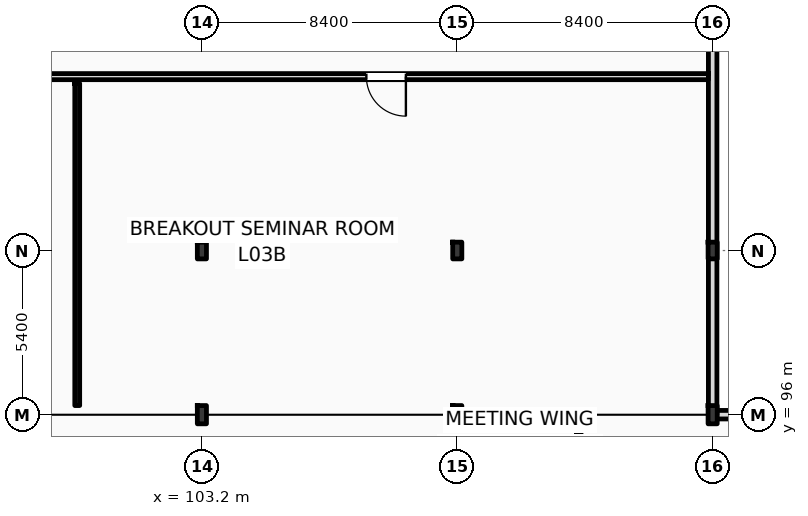
"""IFC4 building model, lengths in metres.
Left out: names, types, materials, properties, quantities, classifications, styles, units other than length and angle.
Written with IfcOpenShell. Run it as: python <this file> out.ifc"""

import sys

from ifc_helpers import new_model, si_unit, direction, frame, frame_2d, origin, origin_2d, place, context, subcontext, project, spatial, rectangle, i_section, extrude, element, fill, save


model = new_model("IFC4")
c1 = context("Model", 3, precision=1e-05, world=origin(), true_north=direction((0.0, 1.0)))
c2 = subcontext(c1, "Body", "Model", "MODEL_VIEW")
j1 = project(units=[si_unit("LENGTHUNIT", "METRE"), si_unit("PLANEANGLEUNIT", "RADIAN")], contexts=[c1])
p1 = place(None, origin())
s1 = spatial("IfcSite", under=j1, at=p1, CompositionType="ELEMENT")
p2 = place(p1, origin())
s2 = spatial("IfcBuilding", under=s1, at=p2, CompositionType="ELEMENT")
p3 = place(p2, frame((0.0, 0.0, 16.2)))
s3 = spatial("IfcBuildingStorey", under=s2, at=p3, CompositionType="ELEMENT", Elevation=16.2)
p4 = place(p3, frame((103.2, 96.0, 0.0), z_axis=(0.0, 0.0, 1.0), x_axis=(1.0, 0.0, 0.0)))
e1 = element("IfcColumn", 1, at=p4, inside=s3, PredefinedType="COLUMN", context=c2, shape_type="SweptSolid", body=[
    extrude(i_section(OverallWidth=0.3, OverallDepth=0.6, WebThickness=0.015, FlangeThickness=0.03, FilletRadius=0.027, at=origin_2d()), origin(), (0.0, 0.0, 1.0), 4.2),
])
p5 = place(p3, frame((103.2, 101.4, 0.0), z_axis=(0.0, 0.0, 1.0), x_axis=(1.0, 0.0, 0.0)))
e2 = element("IfcColumn", 2, at=p5, inside=s3, PredefinedType="COLUMN", context=c2, shape_type="SweptSolid", body=[
    extrude(i_section(OverallWidth=0.3, OverallDepth=0.55, WebThickness=0.015, FlangeThickness=0.029, FilletRadius=0.027, at=origin_2d()), origin(), (0.0, 0.0, 1.0), 4.2),
])
p6 = place(p3, frame((111.6, 96.0, 0.0), z_axis=(0.0, 0.0, 1.0), x_axis=(1.0, 0.0, 0.0)))
e3 = element("IfcColumn", 3, at=p6, inside=s3, PredefinedType="COLUMN", context=c2, shape_type="SweptSolid", body=[
    extrude(i_section(OverallWidth=0.3, OverallDepth=0.6, WebThickness=0.015, FlangeThickness=0.03, FilletRadius=0.027, at=origin_2d()), origin(), (0.0, 0.0, 1.0), 4.2),
])
p7 = place(p3, frame((111.6, 101.4, 0.0), z_axis=(0.0, 0.0, 1.0), x_axis=(1.0, 0.0, 0.0)))
e4 = element("IfcColumn", 4, at=p7, inside=s3, PredefinedType="COLUMN", context=c2, shape_type="SweptSolid", body=[
    extrude(i_section(OverallWidth=0.3, OverallDepth=0.55, WebThickness=0.015, FlangeThickness=0.029, FilletRadius=0.027, at=origin_2d()), origin(), (0.0, 0.0, 1.0), 4.2),
])
p8 = place(p3, frame((120.0, 96.0, 0.0), z_axis=(0.0, 0.0, 1.0), x_axis=(1.0, 0.0, 0.0)))
e5 = element("IfcColumn", 5, at=p8, inside=s3, PredefinedType="COLUMN", context=c2, shape_type="SweptSolid", body=[
    extrude(i_section(OverallWidth=0.3, OverallDepth=0.6, WebThickness=0.015, FlangeThickness=0.03, FilletRadius=0.027, at=origin_2d()), origin(), (0.0, 0.0, 1.0), 4.2),
])
p9 = place(p3, frame((120.0, 101.4, 0.0), z_axis=(0.0, 0.0, 1.0), x_axis=(1.0, 0.0, 0.0)))
e6 = element("IfcColumn", 6, at=p9, inside=s3, PredefinedType="COLUMN", context=c2, shape_type="SweptSolid", body=[
    extrude(i_section(OverallWidth=0.3, OverallDepth=0.55, WebThickness=0.015, FlangeThickness=0.029, FilletRadius=0.027, at=origin_2d()), origin(), (0.0, 0.0, 1.0), 4.2),
])
p10 = place(p3, frame((120.0, 96.0, 0.0), z_axis=(0.0, 0.0, 1.0), x_axis=(1.0, 0.0, 0.0)))
e7 = element("IfcWall", 7, at=p10, inside=s3, PredefinedType="STANDARD", context=c2, shape_type="SweptSolid", body=[
    extrude(rectangle(XDim=8.4, YDim=0.28, at=frame_2d((4.2, 0.0))), origin(), (0.0, 0.0, 1.0), 3.36),
])
p11 = place(p3, frame((120.0, 96.0, 0.0), z_axis=(0.0, 0.0, 1.0), x_axis=(0.0, 1.0, 0.0)))
e8 = element("IfcWall", 8, at=p11, inside=s3, PredefinedType="STANDARD", context=c2, shape_type="SweptSolid", body=[
    extrude(rectangle(XDim=22.0, YDim=0.28, at=frame_2d((11.0, 0.0))), origin(), (0.0, 0.0, 1.0), 3.51),
])
p12 = place(p3, frame((79.76, 107.12, 0.0), z_axis=(0.0, 0.0, 1.0), x_axis=(1.0, 0.0, 0.0)))
e9 = element("IfcWall", 9, at=p12, inside=s3, PredefinedType="PARTITIONING", context=c2, shape_type="SweptSolid", body=[
    extrude(rectangle(XDim=40.1, YDim=0.2, at=frame_2d((20.05, 0.0))), origin(), (0.0, 0.0, 1.0), 3.92),
])
p13 = place(p12, frame((9.35, 0.0, 0.0)))
e10 = element("IfcOpeningElement", 10, at=p13, cuts=e9, PredefinedType="OPENING", context=c2, shape_type="SweptSolid", body=[
    extrude(rectangle(XDim=1.3, YDim=2.2, at=frame_2d((0.65, 1.1))), frame((0.0, 0.11, 0.0), z_axis=(0.0, -1.0, 0.0), x_axis=(1.0, 0.0, 0.0)), (0.0, 0.0, 1.0), 0.22),
])
p14 = place(p12, frame((28.85, 0.0, 0.0)))
e11 = element("IfcOpeningElement", 11, at=p14, cuts=e9, PredefinedType="OPENING", context=c2, shape_type="SweptSolid", body=[
    extrude(rectangle(XDim=1.3, YDim=2.2, at=frame_2d((0.65, 1.1))), frame((0.0, 0.11, 0.0), z_axis=(0.0, -1.0, 0.0), x_axis=(1.0, 0.0, 0.0)), (0.0, 0.0, 1.0), 0.22),
])
p15 = place(p3, frame((99.1, 96.3, 0.0), z_axis=(0.0, 0.0, 1.0), x_axis=(0.0, 1.0, 0.0)))
e12 = element("IfcWall", 12, at=p15, inside=s3, PredefinedType="PARTITIONING", context=c2, shape_type="SweptSolid", body=[
    extrude(rectangle(XDim=10.6, YDim=0.16, at=frame_2d((5.3, 0.0))), origin(), (0.0, 0.0, 1.0), 3.92),
])
p16 = place(p3, frame((115.6, 82.45, 0.0), z_axis=(0.0, 0.0, 1.0), x_axis=(0.0, 1.0, 0.0)))
e13 = element("IfcWall", 13, at=p16, inside=s3, PredefinedType="PARTITIONING", context=c2, shape_type="SweptSolid", body=[
    extrude(rectangle(XDim=12.9, YDim=0.16, at=frame_2d((6.45, 0.0))), origin(), (0.0, 0.0, 1.0), 3.92),
])
p17 = place(p16, frame((5.8, 0.0, 0.0)))
e14 = element("IfcOpeningElement", 14, at=p17, cuts=e13, PredefinedType="OPENING", context=c2, shape_type="SweptSolid", body=[
    extrude(rectangle(XDim=1.3, YDim=2.2, at=frame_2d((0.65, 1.1))), frame((0.0, 0.09, 0.0), z_axis=(0.0, -1.0, 0.0), x_axis=(1.0, 0.0, 0.0)), (0.0, 0.0, 1.0), 0.18),
])
p18 = place(p14, frame((1.3, 0.0, 0.0), z_axis=(0.0, 0.0, 1.0), x_axis=(-1.0, 0.0, 0.0)))
e15 = element("IfcDoor", 15, at=p18, inside=s3, OperationType="SINGLE_SWING_RIGHT", PredefinedType="DOOR", context=c2, shape_type="SweptSolid", body=[
    extrude(rectangle(XDim=1.3, YDim=2.2, at=frame_2d((0.65, 1.1))), frame((0.0, 0.025, 0.0), z_axis=(0.0, -1.0, 0.0), x_axis=(1.0, 0.0, 0.0)), (0.0, 0.0, 1.0), 0.05),
])
fill(e11, e15)
save(model, sys.argv[1])
